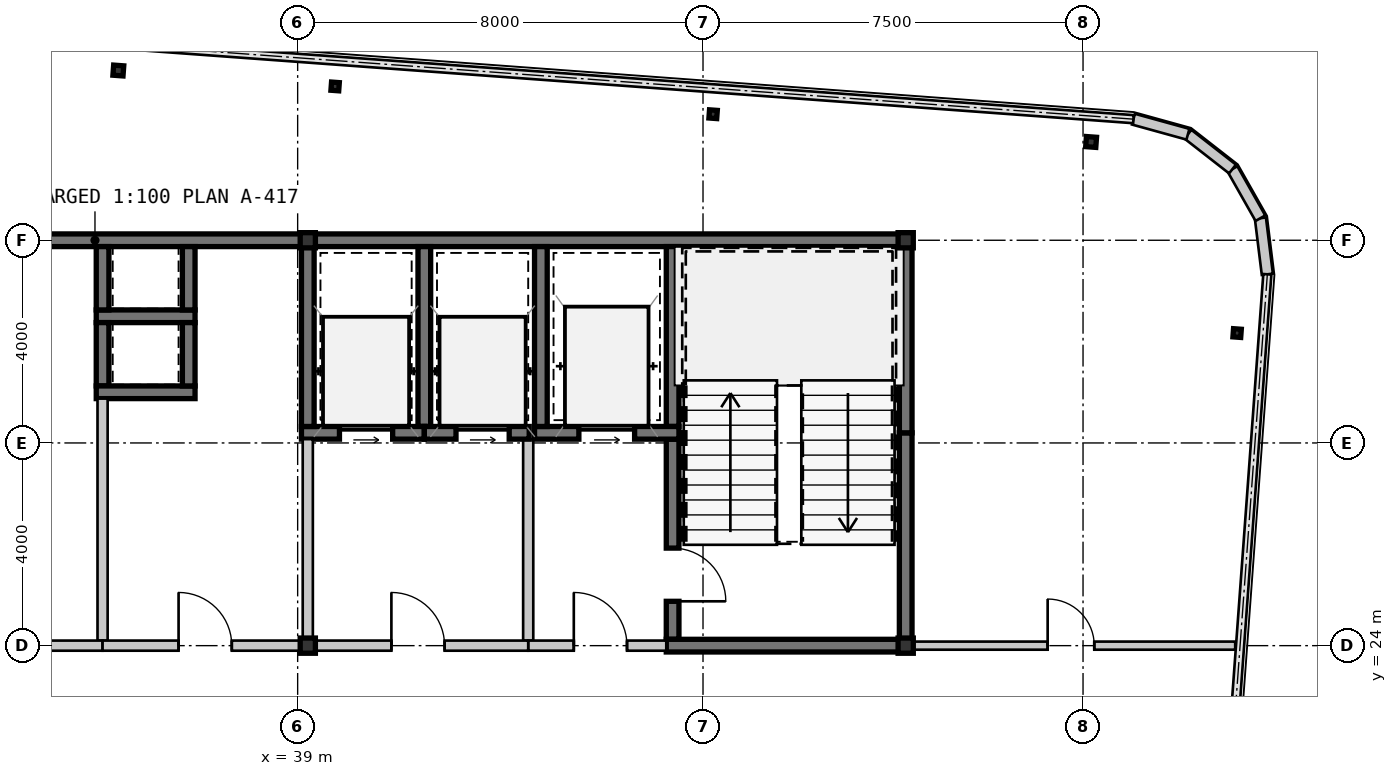
"""IFC4 building model, lengths in metres.
Left out: names, types, materials, properties, quantities, classifications, styles, units other than length and angle.
Written with IfcOpenShell. Run it as: python <this file> out.ifc"""

import sys

from ifc_helpers import new_model, si_unit, direction, frame, frame_2d, origin, origin_2d, place, context, subcontext, project, spatial, rectangle, hollow_rectangle, i_section, extrude, source, transform, mapped, element, fill, save


model = new_model("IFC4")
c1 = context("Model", 3, precision=1e-05, world=origin(), true_north=direction((0.0, 1.0)))
c2 = subcontext(c1, "Body", "Model", "MODEL_VIEW")
j1 = project(units=[si_unit("LENGTHUNIT", "METRE"), si_unit("PLANEANGLEUNIT", "RADIAN")], contexts=[c1])
p1 = place(None, origin())
s1 = spatial("IfcSite", under=j1, at=p1, CompositionType="ELEMENT")
p2 = place(p1, origin())
s2 = spatial("IfcBuilding", under=s1, at=p2, CompositionType="ELEMENT")
p3 = place(p2, frame((0.0, 0.0, 220.85)))
s3 = spatial("IfcBuildingStorey", under=s2, at=p3, CompositionType="ELEMENT", Elevation=220.85)
m1 = source(origin(), c2, "Body", "SweptSolid", [
    extrude(hollow_rectangle(XDim=0.3, YDim=0.3, WallThickness=0.012, at=origin_2d()), origin(), (0.0, 0.0, 1.0), 3.15),
])
for number, where, z_axis, x_axis in (
    (1, (39.2, 24.0, 0.0), (0.0, 0.0, 1.0), (1.0, 0.0, 0.0)),
    (2, (51.0, 24.0, 0.0), (0.0, 0.0, 1.0), (1.0, 0.0, 0.0)),
    (3, (39.2, 32.0, 0.0), (0.0, 0.0, 1.0), (1.0, 0.0, 0.0)),
    (4, (51.0, 32.0, 0.0), (0.0, 0.0, 1.0), (1.0, 0.0, 0.0)),
):
    element("IfcColumn", number, at=place(p3, frame(where, z_axis=z_axis, x_axis=x_axis)), inside=s3, PredefinedType="COLUMN", context=c2, shape_type="MappedRepresentation", body=[
        mapped(m1, transform((0.0, 0.0, 0.0), scale=1.0)),
    ])
m2 = source(origin(), c2, "Body", "SweptSolid", [
    extrude(i_section(OverallWidth=0.154, OverallDepth=0.162, WebThickness=0.008, FlangeThickness=0.011, at=origin_2d()), origin(), (0.0, 0.0, 1.0), 3.15),
])
for number, where, z_axis, x_axis in (
    (5, (39.74, 35.035, 0.0), (0.0, 0.0, 1.0), (0.997, -0.073, 0.0)),
    (6, (47.199, 34.488, 0.0), (0.0, 0.0, 1.0), (0.997, -0.073, 0.0)),
):
    element("IfcColumn", number, at=place(p3, frame(where, z_axis=z_axis, x_axis=x_axis)), inside=s3, PredefinedType="COLUMN", context=c2, shape_type="MappedRepresentation", body=[
        mapped(m2, transform((0.0, 0.0, 0.0), scale=1.0)),
    ])
m3 = source(origin(), c2, "Body", "SweptSolid", [
    extrude(hollow_rectangle(XDim=0.2, YDim=0.2, WallThickness=0.009, at=origin_2d()), origin(), (0.0, 0.0, 1.0), 3.15),
])
p4 = place(p3, frame((54.659, 33.94, 0.0), z_axis=(0.0, 0.0, 1.0), x_axis=(0.997314477224, -0.073238197128, 0.0)))
e7 = element("IfcColumn", 7, at=p4, inside=s3, PredefinedType="COLUMN", context=c2, shape_type="MappedRepresentation", body=[
    mapped(m3, transform((0.0, 0.0, 0.0), scale=1.0)),
])
p5 = place(p3, frame((57.541, 30.169, 0.0), z_axis=(0.0, 0.0, 1.0), x_axis=(0.997314477224, -0.073238197128, 0.0)))
e8 = element("IfcColumn", 8, at=p5, inside=s3, PredefinedType="COLUMN", context=c2, shape_type="MappedRepresentation", body=[
    mapped(m2, transform((0.0, 0.0, 0.0), scale=1.0)),
])
p6 = place(p3, frame((35.461, 35.35, 0.0), z_axis=(0.0, 0.0, 1.0), x_axis=(0.997314477224, -0.073238197128, 0.0)))
e9 = element("IfcColumn", 9, at=p6, inside=s3, PredefinedType="COLUMN", context=c2, shape_type="MappedRepresentation", body=[
    mapped(m3, transform((0.0, 0.0, 0.0), scale=1.0)),
])
m4 = source(origin(), c2, "Body", "SweptSolid", [
    extrude(rectangle(XDim=1.116, YDim=0.22, at=frame_2d((0.558, 0.0))), origin(), (0.0, 0.0, 1.0), 2.93),
])
p7 = place(p3, frame((58.137, 31.328, 0.0), z_axis=(0.0, 0.0, 1.0), x_axis=(-0.122742076028, 0.992438604032, 0.0)))
e10 = element("IfcWall", 10, at=p7, inside=s3, PredefinedType="SOLIDWALL", context=c2, shape_type="MappedRepresentation", body=[
    mapped(m4, transform((0.0, 0.0, 0.0), scale=1.0)),
])
m5 = source(origin(), c2, "Body", "SweptSolid", [
    extrude(rectangle(XDim=1.116, YDim=0.22, at=frame_2d((0.558, 0.0))), origin(), (0.0, 0.0, 1.0), 2.93),
])
p8 = place(p3, frame((58.0, 32.436, 0.0), z_axis=(0.0, 0.0, 1.0), x_axis=(-0.493167138628, 0.869934579941, 0.0)))
e11 = element("IfcWall", 11, at=p8, inside=s3, PredefinedType="SOLIDWALL", context=c2, shape_type="MappedRepresentation", body=[
    mapped(m5, transform((0.0, 0.0, 0.0), scale=1.0)),
])
p9 = place(p3, frame((57.45, 33.406, 0.0), z_axis=(0.0, 0.0, 1.0), x_axis=(-0.788597772321, 0.614909386406, 0.0)))
e12 = element("IfcWall", 12, at=p9, inside=s3, PredefinedType="SOLIDWALL", context=c2, shape_type="MappedRepresentation", body=[
    mapped(m4, transform((0.0, 0.0, 0.0), scale=1.0)),
])
p10 = place(p3, frame((56.57, 34.093, 0.0), z_axis=(0.0, 0.0, 1.0), x_axis=(-0.963833843713, 0.266503886865, 0.0)))
e13 = element("IfcWall", 13, at=p10, inside=s3, PredefinedType="SOLIDWALL", context=c2, shape_type="MappedRepresentation", body=[
    mapped(m5, transform((0.0, 0.0, 0.0), scale=1.0)),
])
m6 = source(origin(), c2, "Body", "SweptSolid", [
    extrude(rectangle(XDim=11.2, YDim=0.25, at=frame_2d((5.6, 0.0))), origin(), (0.0, 0.0, 1.0), 2.93),
])
p11 = place(p3, frame((28.0, 32.0, 0.0), z_axis=(0.0, 0.0, 1.0), x_axis=(1.0, 0.0, 0.0)))
e14 = element("IfcWall", 14, at=p11, inside=s3, PredefinedType="SHEAR", context=c2, shape_type="MappedRepresentation", body=[
    mapped(m6, transform((0.0, 0.0, 0.0), scale=1.0)),
])
m7 = source(origin(), c2, "Body", "SweptSolid", [
    extrude(rectangle(XDim=11.925, YDim=0.25, at=frame_2d((5.962, 0.0))), origin(), (0.0, 0.0, 1.0), 2.93),
])
p12 = place(p3, frame((39.2, 32.0, 0.0), z_axis=(0.0, 0.0, 1.0), x_axis=(1.0, 0.0, 0.0)))
e15 = element("IfcWall", 15, at=p12, inside=s3, PredefinedType="SHEAR", context=c2, shape_type="MappedRepresentation", body=[
    mapped(m7, transform((0.0, 0.0, 0.0), scale=1.0)),
])
m8 = source(origin(), c2, "Body", "SweptSolid", [
    extrude(rectangle(XDim=4.075, YDim=0.25, at=frame_2d((2.038, 0.0))), origin(), (0.0, 0.0, 1.0), 2.93),
])
p13 = place(p3, frame((51.0, 24.125, 0.0), z_axis=(0.0, 0.0, 1.0), x_axis=(0.0, 1.0, 0.0)))
e16 = element("IfcWall", 16, at=p13, inside=s3, PredefinedType="SHEAR", context=c2, shape_type="MappedRepresentation", body=[
    mapped(m8, transform((0.0, 0.0, 0.0), scale=1.0)),
])
m9 = source(origin(), c2, "Body", "SweptSolid", [
    extrude(rectangle(XDim=3.675, YDim=0.25, at=frame_2d((1.837, 0.0))), origin(), (0.0, 0.0, 1.0), 2.93),
])
p14 = place(p3, frame((51.0, 28.2, 0.0), z_axis=(0.0, 0.0, 1.0), x_axis=(0.0, 1.0, 0.0)))
e17 = element("IfcWall", 17, at=p14, inside=s3, PredefinedType="SHEAR", context=c2, shape_type="MappedRepresentation", body=[
    mapped(m9, transform((0.0, 0.0, 0.0), scale=1.0)),
])
m10 = source(origin(), c2, "Body", "SweptSolid", [
    extrude(rectangle(XDim=3.55, YDim=0.25, at=frame_2d((1.775, 0.0))), origin(), (0.0, 0.0, 1.0), 2.93),
])
p15 = place(p3, frame((46.4, 31.875, 0.0), z_axis=(0.0, 0.0, 1.0), x_axis=(0.0, -1.0, 0.0)))
e18 = element("IfcWall", 18, at=p15, inside=s3, PredefinedType="SHEAR", context=c2, shape_type="MappedRepresentation", body=[
    mapped(m10, transform((0.0, 0.0, 0.0), scale=1.0)),
])
m11 = source(origin(), c2, "Body", "SweptSolid", [
    extrude(rectangle(XDim=3.95, YDim=0.25, at=frame_2d((1.975, 0.0))), origin(), (0.0, 0.0, 1.0), 2.93),
])
p16 = place(p3, frame((46.4, 28.075, 0.0), z_axis=(0.0, 0.0, 1.0), x_axis=(0.0, -1.0, 0.0)))
e19 = element("IfcWall", 19, at=p16, inside=s3, PredefinedType="SHEAR", context=c2, shape_type="MappedRepresentation", body=[
    mapped(m11, transform((0.0, 0.0, 0.0), scale=1.0)),
])
m12 = source(origin(), c2, "Body", "SweptSolid", [
    extrude(rectangle(XDim=1.05, YDim=2.1, at=frame_2d((0.525, 1.05))), frame((0.0, 0.135, 0.0), z_axis=(0.0, -1.0, 0.0), x_axis=(1.0, 0.0, 0.0)), (0.0, 0.0, 1.0), 0.27),
])
p17 = place(p16, frame((2.15, 0.0, 0.0)))
e20 = element("IfcOpeningElement", 20, at=p17, cuts=e19, PredefinedType="OPENING", context=c2, shape_type="MappedRepresentation", body=[
    mapped(m12, transform((0.0, 0.0, 0.0), scale=1.0)),
])
m13 = source(origin(), c2, "Body", "SweptSolid", [
    extrude(rectangle(XDim=4.85, YDim=0.25, at=frame_2d((2.425, 0.0))), origin(), (0.0, 0.0, 1.0), 2.93),
])
p18 = place(p3, frame((46.275, 24.0, 0.0), z_axis=(0.0, 0.0, 1.0), x_axis=(1.0, 0.0, 0.0)))
e21 = element("IfcWall", 21, at=p18, inside=s3, PredefinedType="SHEAR", context=c2, shape_type="MappedRepresentation", body=[
    mapped(m13, transform((0.0, 0.0, 0.0), scale=1.0)),
])
m14 = source(origin(), c2, "Body", "SweptSolid", [
    extrude(rectangle(XDim=2.85, YDim=0.25, at=frame_2d((1.425, 0.0))), origin(), (0.0, 0.0, 1.0), 2.93),
])
p19 = place(p3, frame((43.675, 28.2, 0.0), z_axis=(0.0, 0.0, 1.0), x_axis=(1.0, 0.0, 0.0)))
e22 = element("IfcWall", 22, at=p19, inside=s3, PredefinedType="SHEAR", context=c2, shape_type="MappedRepresentation", body=[
    mapped(m14, transform((0.0, 0.0, 0.0), scale=1.0)),
])
m15 = source(origin(), c2, "Body", "SweptSolid", [
    extrude(rectangle(XDim=1.1, YDim=2.15, at=frame_2d((0.55, 1.075))), frame((0.0, 0.135, 0.0), z_axis=(0.0, -1.0, 0.0), x_axis=(1.0, 0.0, 0.0)), (0.0, 0.0, 1.0), 0.27),
])
p20 = place(p19, frame((0.875, 0.0, 0.0)))
e23 = element("IfcOpeningElement", 23, at=p20, cuts=e22, PredefinedType="OPENING", context=c2, shape_type="MappedRepresentation", body=[
    mapped(m15, transform((0.0, 0.0, 0.0), scale=1.0)),
])
p21 = place(p3, frame((43.8, 31.875, 0.0), z_axis=(0.0, 0.0, 1.0), x_axis=(0.0, -1.0, 0.0)))
e24 = element("IfcWall", 24, at=p21, inside=s3, PredefinedType="SHEAR", context=c2, shape_type="MappedRepresentation", body=[
    mapped(m10, transform((0.0, 0.0, 0.0), scale=1.0)),
])
m16 = source(origin(), c2, "Body", "SweptSolid", [
    extrude(rectangle(XDim=3.975, YDim=0.2, at=frame_2d((1.987, 0.0))), origin(), (0.0, 0.0, 1.0), 2.93),
])
p22 = place(p3, frame((43.55, 28.075, 0.0), z_axis=(0.0, 0.0, 1.0), x_axis=(0.0, -1.0, 0.0)))
e25 = element("IfcWall", 25, at=p22, inside=s3, PredefinedType="SOLIDWALL", context=c2, shape_type="MappedRepresentation", body=[
    mapped(m16, transform((0.0, 0.0, 0.0), scale=1.0)),
])
m17 = source(origin(), c2, "Body", "SweptSolid", [
    extrude(rectangle(XDim=2.725, YDim=0.2, at=frame_2d((1.362, 0.0))), origin(), (0.0, 0.0, 1.0), 2.397),
])
p23 = place(p3, frame((43.55, 24.0, 0.0), z_axis=(0.0, 0.0, 1.0), x_axis=(1.0, 0.0, 0.0)))
e26 = element("IfcWall", 26, at=p23, inside=s3, PredefinedType="SOLIDWALL", context=c2, shape_type="MappedRepresentation", body=[
    mapped(m17, transform((0.0, 0.0, 0.0), scale=1.0)),
])
m18 = source(origin(), c2, "Body", "SweptSolid", [
    extrude(rectangle(XDim=1.05, YDim=2.1, at=frame_2d((0.525, 1.05))), frame((0.0, 0.11, 0.0), z_axis=(0.0, -1.0, 0.0), x_axis=(1.0, 0.0, 0.0)), (0.0, 0.0, 1.0), 0.22),
])
p24 = place(p23, frame((0.9, 0.0, 0.0)))
e27 = element("IfcOpeningElement", 27, at=p24, cuts=e26, PredefinedType="OPENING", context=c2, shape_type="MappedRepresentation", body=[
    mapped(m18, transform((0.0, 0.0, 0.0), scale=1.0)),
])
m19 = source(origin(), c2, "Body", "SweptSolid", [
    extrude(rectangle(XDim=1.95, YDim=0.25, at=frame_2d((0.975, 0.0))), origin(), (0.0, 0.0, 1.0), 2.93),
])
p25 = place(p3, frame((35.025, 30.5, 0.0), z_axis=(0.0, 0.0, 1.0), x_axis=(1.0, 0.0, 0.0)))
e28 = element("IfcWall", 28, at=p25, inside=s3, PredefinedType="SHEAR", context=c2, shape_type="MappedRepresentation", body=[
    mapped(m19, transform((0.0, 0.0, 0.0), scale=1.0)),
])
m20 = source(origin(), c2, "Body", "SweptSolid", [
    extrude(rectangle(XDim=1.25, YDim=0.25, at=frame_2d((0.625, 0.0))), origin(), (0.0, 0.0, 1.0), 2.93),
])
for number, where, z_axis, x_axis in (
    (29, (35.15, 31.875, 0.0), (0.0, 0.0, 1.0), (0.0, -1.0, 0.0)),
    (30, (36.85, 30.625, 0.0), (0.0, 0.0, 1.0), (0.0, 1.0, 0.0)),
    (31, (35.15, 30.375, 0.0), (0.0, 0.0, 1.0), (0.0, -1.0, 0.0)),
):
    element("IfcWall", number, at=place(p3, frame(where, z_axis=z_axis, x_axis=x_axis)), inside=s3, PredefinedType="SHEAR", context=c2, shape_type="MappedRepresentation", body=[
        mapped(m20, transform((0.0, 0.0, 0.0), scale=1.0)),
    ])
p26 = place(p3, frame((35.025, 29.0, 0.0), z_axis=(0.0, 0.0, 1.0), x_axis=(1.0, 0.0, 0.0)))
e32 = element("IfcWall", 32, at=p26, inside=s3, PredefinedType="SHEAR", context=c2, shape_type="MappedRepresentation", body=[
    mapped(m19, transform((0.0, 0.0, 0.0), scale=1.0)),
])
p27 = place(p3, frame((36.85, 29.125, 0.0), z_axis=(0.0, 0.0, 1.0), x_axis=(0.0, 1.0, 0.0)))
e33 = element("IfcWall", 33, at=p27, inside=s3, PredefinedType="SHEAR", context=c2, shape_type="MappedRepresentation", body=[
    mapped(m20, transform((0.0, 0.0, 0.0), scale=1.0)),
])
p28 = place(p3, frame((41.5, 28.325, 0.0), z_axis=(0.0, 0.0, 1.0), x_axis=(0.0, 1.0, 0.0)))
e34 = element("IfcWall", 34, at=p28, inside=s3, PredefinedType="SHEAR", context=c2, shape_type="MappedRepresentation", body=[
    mapped(m10, transform((0.0, 0.0, 0.0), scale=1.0)),
])
m21 = source(origin(), c2, "Body", "SweptSolid", [
    extrude(rectangle(XDim=2.425, YDim=0.25, at=frame_2d((1.212, 0.0))), origin(), (0.0, 0.0, 1.0), 2.93),
])
p29 = place(p3, frame((39.075, 28.2, 0.0), z_axis=(0.0, 0.0, 1.0), x_axis=(1.0, 0.0, 0.0)))
e35 = element("IfcWall", 35, at=p29, inside=s3, PredefinedType="SHEAR", context=c2, shape_type="MappedRepresentation", body=[
    mapped(m21, transform((0.0, 0.0, 0.0), scale=1.0)),
])
m22 = source(origin(), c2, "Body", "SweptSolid", [
    extrude(rectangle(XDim=1.05, YDim=2.15, at=frame_2d((0.525, 1.075))), frame((0.0, 0.135, 0.0), z_axis=(0.0, -1.0, 0.0), x_axis=(1.0, 0.0, 0.0)), (0.0, 0.0, 1.0), 0.27),
])
p30 = place(p29, frame((0.75, 0.0, 0.0)))
e36 = element("IfcOpeningElement", 36, at=p30, cuts=e35, PredefinedType="OPENING", context=c2, shape_type="MappedRepresentation", body=[
    mapped(m22, transform((0.0, 0.0, 0.0), scale=1.0)),
])
p31 = place(p3, frame((39.2, 31.875, 0.0), z_axis=(0.0, 0.0, 1.0), x_axis=(0.0, -1.0, 0.0)))
e37 = element("IfcWall", 37, at=p31, inside=s3, PredefinedType="SHEAR", context=c2, shape_type="MappedRepresentation", body=[
    mapped(m10, transform((0.0, 0.0, 0.0), scale=1.0)),
])
m23 = source(origin(), c2, "Body", "SweptSolid", [
    extrude(rectangle(XDim=2.07, YDim=0.25, at=frame_2d((1.035, 0.0))), origin(), (0.0, 0.0, 1.0), 2.93),
])
p32 = place(p3, frame((41.5, 28.2, 0.0), z_axis=(0.0, 0.0, 1.0), x_axis=(1.0, 0.0, 0.0)))
e38 = element("IfcWall", 38, at=p32, inside=s3, PredefinedType="SHEAR", context=c2, shape_type="MappedRepresentation", body=[
    mapped(m23, transform((0.0, 0.0, 0.0), scale=1.0)),
])
p33 = place(p32, frame((0.625, 0.0, 0.0)))
e39 = element("IfcOpeningElement", 39, at=p33, cuts=e38, PredefinedType="OPENING", context=c2, shape_type="MappedRepresentation", body=[
    mapped(m22, transform((0.0, 0.0, 0.0), scale=1.0)),
])
m24 = source(origin(), c2, "Body", "SweptSolid", [
    extrude(rectangle(XDim=3.975, YDim=0.2, at=frame_2d((1.987, 0.0))), origin(), (0.0, 0.0, 1.0), 2.47),
])
p34 = place(p3, frame((39.2, 24.1, 0.0), z_axis=(0.0, 0.0, 1.0), x_axis=(0.0, 1.0, 0.0)))
e40 = element("IfcWall", 40, at=p34, inside=s3, PredefinedType="SOLIDWALL", context=c2, shape_type="MappedRepresentation", body=[
    mapped(m24, transform((0.0, 0.0, 0.0), scale=1.0)),
])
m25 = source(origin(), c2, "Body", "SweptSolid", [
    extrude(rectangle(XDim=4.35, YDim=0.2, at=frame_2d((2.175, 0.0))), origin(), (0.0, 0.0, 1.0), 2.397),
])
p35 = place(p3, frame((43.55, 24.0, 0.0), z_axis=(0.0, 0.0, 1.0), x_axis=(-1.0, 0.0, 0.0)))
e41 = element("IfcWall", 41, at=p35, inside=s3, PredefinedType="SOLIDWALL", context=c2, shape_type="MappedRepresentation", body=[
    mapped(m25, transform((0.0, 0.0, 0.0), scale=1.0)),
])
p36 = place(p35, frame((1.65, 0.0, 0.0)))
e42 = element("IfcOpeningElement", 42, at=p36, cuts=e41, PredefinedType="OPENING", context=c2, shape_type="MappedRepresentation", body=[
    mapped(m18, transform((0.0, 0.0, 0.0), scale=1.0)),
])
m26 = source(origin(), c2, "Body", "SweptSolid", [
    extrude(rectangle(XDim=4.775, YDim=0.2, at=frame_2d((2.387, 0.0))), origin(), (0.0, 0.0, 1.0), 2.93),
])
p37 = place(p3, frame((35.15, 28.875, 0.0), z_axis=(0.0, 0.0, 1.0), x_axis=(0.0, -1.0, 0.0)))
e43 = element("IfcWall", 43, at=p37, inside=s3, PredefinedType="SOLIDWALL", context=c2, shape_type="MappedRepresentation", body=[
    mapped(m26, transform((0.0, 0.0, 0.0), scale=1.0)),
])
m27 = source(origin(), c2, "Body", "SweptSolid", [
    extrude(rectangle(XDim=8.7, YDim=0.2, at=frame_2d((4.35, 0.0))), origin(), (0.0, 0.0, 1.0), 2.47),
])
p38 = place(p3, frame((35.15, 24.0, 0.0), z_axis=(0.0, 0.0, 1.0), x_axis=(-1.0, 0.0, 0.0)))
e44 = element("IfcWall", 44, at=p38, inside=s3, PredefinedType="SOLIDWALL", context=c2, shape_type="MappedRepresentation", body=[
    mapped(m27, transform((0.0, 0.0, 0.0), scale=1.0)),
])
p39 = place(p38, frame((3.825, 0.0, 0.0)))
e45 = element("IfcOpeningElement", 45, at=p39, cuts=e44, PredefinedType="OPENING", context=c2, shape_type="MappedRepresentation", body=[
    mapped(m18, transform((0.0, 0.0, 0.0), scale=1.0)),
])
m28 = source(origin(), c2, "Body", "SweptSolid", [
    extrude(rectangle(XDim=4.05, YDim=0.2, at=frame_2d((2.025, 0.0))), origin(), (0.0, 0.0, 1.0), 2.47),
])
p40 = place(p3, frame((39.2, 24.0, 0.0), z_axis=(0.0, 0.0, 1.0), x_axis=(-1.0, 0.0, 0.0)))
e46 = element("IfcWall", 46, at=p40, inside=s3, PredefinedType="SOLIDWALL", context=c2, shape_type="MappedRepresentation", body=[
    mapped(m28, transform((0.0, 0.0, 0.0), scale=1.0)),
])
p41 = place(p40, frame((1.5, 0.0, 0.0)))
e47 = element("IfcOpeningElement", 47, at=p41, cuts=e46, PredefinedType="OPENING", context=c2, shape_type="MappedRepresentation", body=[
    mapped(m18, transform((0.0, 0.0, 0.0), scale=1.0)),
])
m29 = source(origin(), c2, "Body", "SweptSolid", [
    extrude(rectangle(XDim=6.378, YDim=0.16, at=frame_2d((3.189, 0.0))), origin(), (0.0, 0.0, 1.0), 2.93),
])
p42 = place(p3, frame((51.125, 24.0, 0.0), z_axis=(0.0, 0.0, 1.0), x_axis=(1.0, 0.0, 0.0)))
e48 = element("IfcWall", 48, at=p42, inside=s3, PredefinedType="PARTITIONING", context=c2, shape_type="MappedRepresentation", body=[
    mapped(m29, transform((0.0, 0.0, 0.0), scale=1.0)),
])
m30 = source(origin(), c2, "Body", "SweptSolid", [
    extrude(rectangle(XDim=0.92, YDim=2.1, at=frame_2d((0.46, 1.05))), frame((0.0, 0.09, 0.0), z_axis=(0.0, -1.0, 0.0), x_axis=(1.0, 0.0, 0.0)), (0.0, 0.0, 1.0), 0.18),
])
p43 = place(p42, frame((2.677, 0.0, 0.0)))
e49 = element("IfcOpeningElement", 49, at=p43, cuts=e48, PredefinedType="OPENING", context=c2, shape_type="MappedRepresentation", body=[
    mapped(m30, transform((0.0, 0.0, 0.0), scale=1.0)),
])
m31 = source(origin(), c2, "Body", "SweptSolid", [
    extrude(rectangle(XDim=1.05, YDim=2.1, at=frame_2d((0.525, 1.05))), frame((0.0, 0.025, 0.0), z_axis=(0.0, -1.0, 0.0), x_axis=(1.0, 0.0, 0.0)), (0.0, 0.0, 1.0), 0.05),
])
p44 = place(p17, origin())
e50 = element("IfcDoor", 50, at=p44, inside=s3, OperationType="SINGLE_SWING_RIGHT", PredefinedType="DOOR", context=c2, shape_type="MappedRepresentation", body=[
    mapped(m31, transform((0.0, 0.0, 0.0), scale=1.0)),
])
fill(e20, e50)
m32 = source(origin(), c2, "Body", "SweptSolid", [
    extrude(rectangle(XDim=1.1, YDim=2.15, at=frame_2d((0.55, 1.075))), frame((0.0, 0.025, 0.0), z_axis=(0.0, -1.0, 0.0), x_axis=(1.0, 0.0, 0.0)), (0.0, 0.0, 1.0), 0.05),
])
p45 = place(p20, origin())
e51 = element("IfcDoor", 51, at=p45, inside=s3, OperationType="SLIDING_TO_LEFT", PredefinedType="DOOR", context=c2, shape_type="MappedRepresentation", body=[
    mapped(m32, transform((0.0, 0.0, 0.0), scale=1.0)),
])
fill(e23, e51)
p46 = place(p24, origin())
e52 = element("IfcDoor", 52, at=p46, inside=s3, OperationType="SINGLE_SWING_LEFT", PredefinedType="DOOR", context=c2, shape_type="MappedRepresentation", body=[
    mapped(m31, transform((0.0, 0.0, 0.0), scale=1.0)),
])
fill(e27, e52)
m33 = source(origin(), c2, "Body", "SweptSolid", [
    extrude(rectangle(XDim=1.05, YDim=2.15, at=frame_2d((0.525, 1.075))), frame((0.0, 0.025, 0.0), z_axis=(0.0, -1.0, 0.0), x_axis=(1.0, 0.0, 0.0)), (0.0, 0.0, 1.0), 0.05),
])
p47 = place(p30, origin())
e53 = element("IfcDoor", 53, at=p47, inside=s3, OperationType="SLIDING_TO_LEFT", PredefinedType="DOOR", context=c2, shape_type="MappedRepresentation", body=[
    mapped(m33, transform((0.0, 0.0, 0.0), scale=1.0)),
])
fill(e36, e53)
p48 = place(p33, origin())
e54 = element("IfcDoor", 54, at=p48, inside=s3, OperationType="SLIDING_TO_LEFT", PredefinedType="DOOR", context=c2, shape_type="MappedRepresentation", body=[
    mapped(m33, transform((0.0, 0.0, 0.0), scale=1.0)),
])
fill(e39, e54)
p49 = place(p36, frame((1.05, 0.0, 0.0), z_axis=(0.0, 0.0, 1.0), x_axis=(-1.0, 0.0, 0.0)))
e55 = element("IfcDoor", 55, at=p49, inside=s3, OperationType="SINGLE_SWING_LEFT", PredefinedType="DOOR", context=c2, shape_type="MappedRepresentation", body=[
    mapped(m31, transform((0.0, 0.0, 0.0), scale=1.0)),
])
fill(e42, e55)
p50 = place(p41, frame((1.05, 0.0, 0.0), z_axis=(0.0, 0.0, 1.0), x_axis=(-1.0, 0.0, 0.0)))
e56 = element("IfcDoor", 56, at=p50, inside=s3, OperationType="SINGLE_SWING_LEFT", PredefinedType="DOOR", context=c2, shape_type="MappedRepresentation", body=[
    mapped(m31, transform((0.0, 0.0, 0.0), scale=1.0)),
])
fill(e47, e56)
m34 = source(origin(), c2, "Body", "SweptSolid", [
    extrude(rectangle(XDim=0.92, YDim=2.1, at=frame_2d((0.46, 1.05))), frame((0.0, 0.025, 0.0), z_axis=(0.0, -1.0, 0.0), x_axis=(1.0, 0.0, 0.0)), (0.0, 0.0, 1.0), 0.05),
])
p51 = place(p43, origin())
e57 = element("IfcDoor", 57, at=p51, inside=s3, OperationType="SINGLE_SWING_LEFT", PredefinedType="DOOR", context=c2, shape_type="MappedRepresentation", body=[
    mapped(m34, transform((0.0, 0.0, 0.0), scale=1.0)),
])
fill(e49, e57)
save(model, sys.argv[1])
